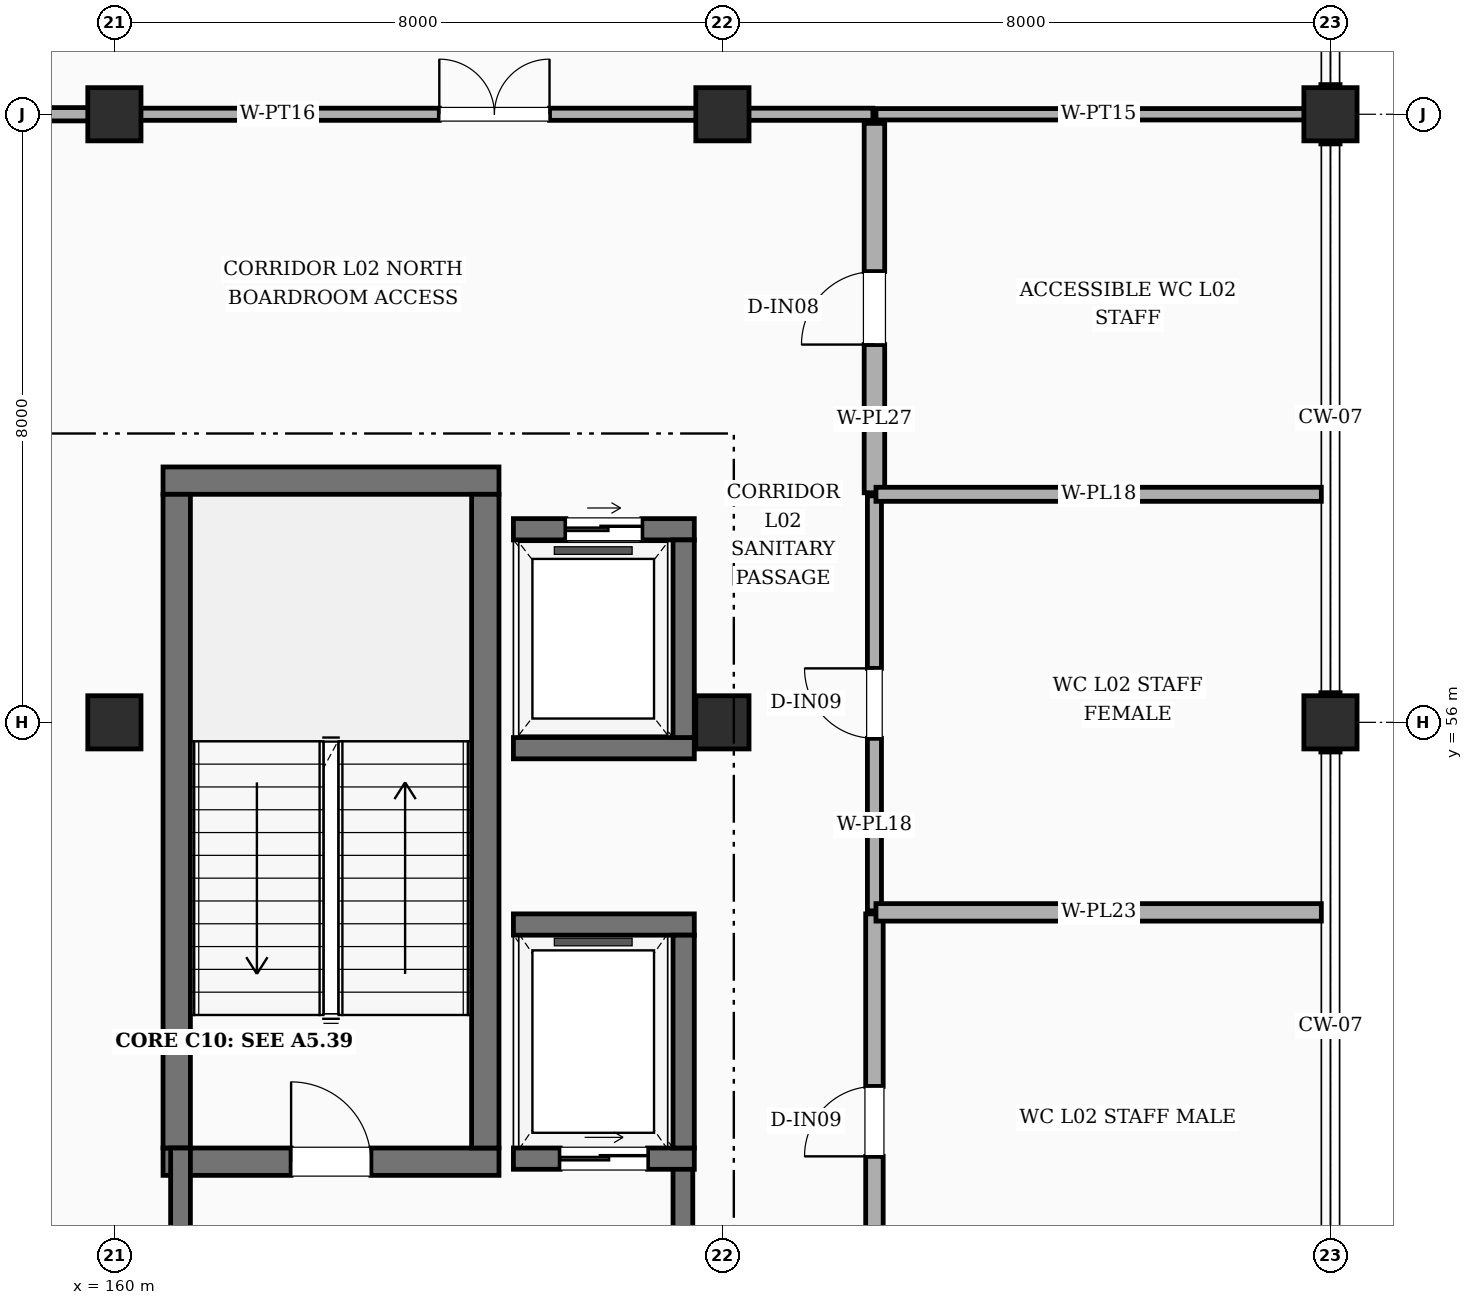
"""IFC4 building model, lengths in metres.
Left out: names, types, materials, properties, quantities, classifications, styles, units other than length and angle.
Written with IfcOpenShell. Run it as: python <this file> out.ifc"""

import sys

from ifc_helpers import new_model, si_unit, direction, frame, frame_2d, origin, origin_2d, place, context, subcontext, project, spatial, rectangle, extrude, element, fill, save


model = new_model("IFC4")
c1 = context("Model", 3, precision=1e-05, world=origin(), true_north=direction((0.0, 1.0)))
c2 = subcontext(c1, "Body", "Model", "MODEL_VIEW")
j1 = project(units=[si_unit("LENGTHUNIT", "METRE"), si_unit("PLANEANGLEUNIT", "RADIAN")], contexts=[c1])
p1 = place(None, origin())
s1 = spatial("IfcSite", under=j1, at=p1, CompositionType="ELEMENT")
p2 = place(p1, origin())
s2 = spatial("IfcBuilding", under=s1, at=p2, CompositionType="ELEMENT")
p3 = place(p2, frame((0.0, 0.0, 10.8)))
s3 = spatial("IfcBuildingStorey", under=s2, at=p3, CompositionType="ELEMENT", Elevation=10.8)
for number, where, z_axis, x_axis in (
    (1, (160.0, 56.0, 0.0), (0.0, 0.0, 1.0), (1.0, 0.0, 0.0)),
    (2, (160.0, 64.0, 0.0), (0.0, 0.0, 1.0), (1.0, 0.0, 0.0)),
    (3, (168.0, 56.0, 0.0), (0.0, 0.0, 1.0), (1.0, 0.0, 0.0)),
    (4, (168.0, 64.0, 0.0), (0.0, 0.0, 1.0), (1.0, 0.0, 0.0)),
    (5, (176.0, 56.0, 0.0), (0.0, 0.0, 1.0), (1.0, 0.0, 0.0)),
    (6, (176.0, 64.0, 0.0), (0.0, 0.0, 1.0), (1.0, 0.0, 0.0)),
):
    element("IfcColumn", number, at=place(p3, frame(where, z_axis=z_axis, x_axis=x_axis)), inside=s3, PredefinedType="COLUMN", context=c2, shape_type="SweptSolid", body=[
        extrude(rectangle(XDim=0.7, YDim=0.7, at=origin_2d()), origin(), (0.0, 0.0, 1.0), 4.2),
    ])
p4 = place(p3, frame((160.64, 50.22, 0.0), z_axis=(0.0, 0.0, 1.0), x_axis=(1.0, 0.0, 0.0)))
e7 = element("IfcWall", 7, at=p4, inside=s3, PredefinedType="SHEAR", context=c2, shape_type="SweptSolid", body=[
    extrude(rectangle(XDim=4.42, YDim=0.36, at=frame_2d((2.21, 0.0))), origin(), (0.0, 0.0, 1.0), 4.2),
])
p5 = place(p4, frame((1.685, 0.0, 0.0)))
e8 = element("IfcOpeningElement", 8, at=p5, cuts=e7, PredefinedType="OPENING", context=c2, shape_type="SweptSolid", body=[
    extrude(rectangle(XDim=1.05, YDim=2.15, at=frame_2d((0.525, 1.075))), frame((0.0, 0.19, 0.0), z_axis=(0.0, -1.0, 0.0), x_axis=(1.0, 0.0, 0.0)), (0.0, 0.0, 1.0), 0.38),
])
p6 = place(p3, frame((160.64, 59.18, 0.0), z_axis=(0.0, 0.0, 1.0), x_axis=(1.0, 0.0, 0.0)))
e9 = element("IfcWall", 9, at=p6, inside=s3, PredefinedType="SHEAR", context=c2, shape_type="SweptSolid", body=[
    extrude(rectangle(XDim=4.42, YDim=0.36, at=frame_2d((2.21, 0.0))), origin(), (0.0, 0.0, 1.0), 4.2),
])
for number, where, z_axis, x_axis in (
    (10, (160.82, 50.4, 0.0), (0.0, 0.0, 1.0), (0.0, 1.0, 0.0)),
    (11, (164.88, 50.4, 0.0), (0.0, 0.0, 1.0), (0.0, 1.0, 0.0)),
):
    element("IfcWall", number, at=place(p3, frame(where, z_axis=z_axis, x_axis=x_axis)), inside=s3, PredefinedType="SHEAR", context=c2, shape_type="SweptSolid", body=[
        extrude(rectangle(XDim=8.6, YDim=0.36, at=frame_2d((4.3, 0.0))), origin(), (0.0, 0.0, 1.0), 4.2),
    ])
for number, where, z_axis, x_axis in (
    (12, (160.87, 46.54, 0.0), (0.0, 0.0, 1.0), (0.0, 1.0, 0.0)),
    (13, (167.48, 46.54, 0.0), (0.0, 0.0, 1.0), (0.0, 1.0, 0.0)),
):
    element("IfcWall", number, at=place(p3, frame(where, z_axis=z_axis, x_axis=x_axis)), inside=s3, PredefinedType="SHEAR", context=c2, shape_type="SweptSolid", body=[
        extrude(rectangle(XDim=3.86, YDim=0.26, at=frame_2d((1.93, 0.0))), origin(), (0.0, 0.0, 1.0), 4.2),
    ])
p7 = place(p3, frame((165.25, 50.26, 0.0), z_axis=(0.0, 0.0, 1.0), x_axis=(1.0, 0.0, 0.0)))
e14 = element("IfcWall", 14, at=p7, inside=s3, PredefinedType="SHEAR", context=c2, shape_type="SweptSolid", body=[
    extrude(rectangle(XDim=2.38, YDim=0.28, at=frame_2d((1.19, 0.0))), origin(), (0.0, 0.0, 1.0), 4.2),
])
p8 = place(p7, frame((0.615, 0.0, 0.0)))
e15 = element("IfcOpeningElement", 15, at=p8, cuts=e14, PredefinedType="OPENING", context=c2, shape_type="SweptSolid", body=[
    extrude(rectangle(XDim=1.15, YDim=2.2, at=frame_2d((0.575, 1.1))), frame((0.0, 0.15, 0.0), z_axis=(0.0, -1.0, 0.0), x_axis=(1.0, 0.0, 0.0)), (0.0, 0.0, 1.0), 0.3),
])
p9 = place(p3, frame((165.25, 53.34, 0.0), z_axis=(0.0, 0.0, 1.0), x_axis=(1.0, 0.0, 0.0)))
e16 = element("IfcWall", 16, at=p9, inside=s3, PredefinedType="SHEAR", context=c2, shape_type="SweptSolid", body=[
    extrude(rectangle(XDim=2.38, YDim=0.28, at=frame_2d((1.19, 0.0))), origin(), (0.0, 0.0, 1.0), 4.2),
])
p10 = place(p3, frame((167.49, 50.4, 0.0), z_axis=(0.0, 0.0, 1.0), x_axis=(0.0, 1.0, 0.0)))
e17 = element("IfcWall", 17, at=p10, inside=s3, PredefinedType="SHEAR", context=c2, shape_type="SweptSolid", body=[
    extrude(rectangle(XDim=2.8, YDim=0.28, at=frame_2d((1.4, 0.0))), origin(), (0.0, 0.0, 1.0), 4.2),
])
p11 = place(p3, frame((165.25, 55.66, 0.0), z_axis=(0.0, 0.0, 1.0), x_axis=(1.0, 0.0, 0.0)))
e18 = element("IfcWall", 18, at=p11, inside=s3, PredefinedType="SHEAR", context=c2, shape_type="SweptSolid", body=[
    extrude(rectangle(XDim=2.38, YDim=0.28, at=frame_2d((1.19, 0.0))), origin(), (0.0, 0.0, 1.0), 4.2),
])
p12 = place(p3, frame((165.25, 58.54, 0.0), z_axis=(0.0, 0.0, 1.0), x_axis=(1.0, 0.0, 0.0)))
e19 = element("IfcWall", 19, at=p12, inside=s3, PredefinedType="SHEAR", context=c2, shape_type="SweptSolid", body=[
    extrude(rectangle(XDim=2.38, YDim=0.28, at=frame_2d((1.19, 0.0))), origin(), (0.0, 0.0, 1.0), 4.2),
])
p13 = place(p12, frame((0.69, 0.0, 0.0)))
e20 = element("IfcOpeningElement", 20, at=p13, cuts=e19, PredefinedType="OPENING", context=c2, shape_type="SweptSolid", body=[
    extrude(rectangle(XDim=1.0, YDim=2.15, at=frame_2d((0.5, 1.075))), frame((0.0, 0.15, 0.0), z_axis=(0.0, -1.0, 0.0), x_axis=(1.0, 0.0, 0.0)), (0.0, 0.0, 1.0), 0.3),
])
p14 = place(p3, frame((167.49, 55.8, 0.0), z_axis=(0.0, 0.0, 1.0), x_axis=(0.0, 1.0, 0.0)))
e21 = element("IfcWall", 21, at=p14, inside=s3, PredefinedType="SHEAR", context=c2, shape_type="SweptSolid", body=[
    extrude(rectangle(XDim=2.6, YDim=0.28, at=frame_2d((1.3, 0.0))), origin(), (0.0, 0.0, 1.0), 4.2),
])
p15 = place(p3, frame((170.0, 48.02, 0.0), z_axis=(0.0, 0.0, 1.0), x_axis=(0.0, 1.0, 0.0)))
e22 = element("IfcWall", 22, at=p15, inside=s3, PredefinedType="PLUMBINGWALL", context=c2, shape_type="SweptSolid", body=[
    extrude(rectangle(XDim=5.46, YDim=0.23, at=frame_2d((2.73, 0.0))), origin(), (0.0, 0.0, 1.0), 3.25),
])
p16 = place(p15, frame((2.27, 0.0, 0.0)))
e23 = element("IfcOpeningElement", 23, at=p16, cuts=e22, PredefinedType="OPENING", context=c2, shape_type="SweptSolid", body=[
    extrude(rectangle(XDim=0.92, YDim=2.1, at=frame_2d((0.46, 1.05))), frame((0.0, 0.125, 0.0), z_axis=(0.0, -1.0, 0.0), x_axis=(1.0, 0.0, 0.0)), (0.0, 0.0, 1.0), 0.25),
])
p17 = place(p3, frame((170.0, 53.52, 0.0), z_axis=(0.0, 0.0, 1.0), x_axis=(0.0, 1.0, 0.0)))
e24 = element("IfcWall", 24, at=p17, inside=s3, PredefinedType="PLUMBINGWALL", context=c2, shape_type="SweptSolid", body=[
    extrude(rectangle(XDim=5.46, YDim=0.185, at=frame_2d((2.73, 0.0))), origin(), (0.0, 0.0, 1.0), 3.25),
])
p18 = place(p17, frame((2.27, 0.0, 0.0)))
e25 = element("IfcOpeningElement", 25, at=p18, cuts=e24, PredefinedType="OPENING", context=c2, shape_type="SweptSolid", body=[
    extrude(rectangle(XDim=0.92, YDim=2.1, at=frame_2d((0.46, 1.05))), frame((0.0, 0.103, 0.0), z_axis=(0.0, -1.0, 0.0), x_axis=(1.0, 0.0, 0.0)), (0.0, 0.0, 1.0), 0.205),
])
p19 = place(p3, frame((170.0, 59.02, 0.0), z_axis=(0.0, 0.0, 1.0), x_axis=(0.0, 1.0, 0.0)))
e26 = element("IfcWall", 26, at=p19, inside=s3, PredefinedType="PLUMBINGWALL", context=c2, shape_type="SweptSolid", body=[
    extrude(rectangle(XDim=4.86, YDim=0.27, at=frame_2d((2.43, 0.0))), origin(), (0.0, 0.0, 1.0), 3.25),
])
p20 = place(p19, frame((1.95, 0.0, 0.0)))
e27 = element("IfcOpeningElement", 27, at=p20, cuts=e26, PredefinedType="OPENING", context=c2, shape_type="SweptSolid", body=[
    extrude(rectangle(XDim=0.96, YDim=2.1, at=frame_2d((0.48, 1.05))), frame((0.0, 0.145, 0.0), z_axis=(0.0, -1.0, 0.0), x_axis=(1.0, 0.0, 0.0)), (0.0, 0.0, 1.0), 0.29),
])
p21 = place(p3, frame((170.02, 53.5, 0.0), z_axis=(0.0, 0.0, 1.0), x_axis=(1.0, 0.0, 0.0)))
e28 = element("IfcWall", 28, at=p21, inside=s3, PredefinedType="PLUMBINGWALL", context=c2, shape_type="SweptSolid", body=[
    extrude(rectangle(XDim=5.86, YDim=0.23, at=frame_2d((2.93, 0.0))), origin(), (0.0, 0.0, 1.0), 3.33),
])
p22 = place(p3, frame((170.02, 59.0, 0.0), z_axis=(0.0, 0.0, 1.0), x_axis=(1.0, 0.0, 0.0)))
e29 = element("IfcWall", 29, at=p22, inside=s3, PredefinedType="PLUMBINGWALL", context=c2, shape_type="SweptSolid", body=[
    extrude(rectangle(XDim=5.86, YDim=0.185, at=frame_2d((2.93, 0.0))), origin(), (0.0, 0.0, 1.0), 3.33),
])
p23 = place(p3, frame((152.12, 64.0, 0.0), z_axis=(0.0, 0.0, 1.0), x_axis=(1.0, 0.0, 0.0)))
e30 = element("IfcWall", 30, at=p23, inside=s3, PredefinedType="PARTITIONING", context=c2, shape_type="SweptSolid", body=[
    extrude(rectangle(XDim=7.86, YDim=0.175, at=frame_2d((3.93, 0.0))), origin(), (0.0, 0.0, 1.0), 3.25),
])
p24 = place(p3, frame((160.02, 64.0, 0.0), z_axis=(0.0, 0.0, 1.0), x_axis=(1.0, 0.0, 0.0)))
e31 = element("IfcWall", 31, at=p24, inside=s3, PredefinedType="PARTITIONING", context=c2, shape_type="SweptSolid", body=[
    extrude(rectangle(XDim=9.96, YDim=0.16, at=frame_2d((4.98, 0.0))), origin(), (0.0, 0.0, 1.0), 3.25),
])
p25 = place(p24, frame((4.255, 0.0, 0.0)))
e32 = element("IfcOpeningElement", 32, at=p25, cuts=e31, PredefinedType="OPENING", context=c2, shape_type="SweptSolid", body=[
    extrude(rectangle(XDim=1.45, YDim=2.2, at=frame_2d((0.725, 1.1))), frame((0.0, 0.09, 0.0), z_axis=(0.0, -1.0, 0.0), x_axis=(1.0, 0.0, 0.0)), (0.0, 0.0, 1.0), 0.18),
])
p26 = place(p3, frame((170.02, 64.0, 0.0), z_axis=(0.0, 0.0, 1.0), x_axis=(1.0, 0.0, 0.0)))
e33 = element("IfcWall", 33, at=p26, inside=s3, PredefinedType="PARTITIONING", context=c2, shape_type="SweptSolid", body=[
    extrude(rectangle(XDim=5.86, YDim=0.15, at=frame_2d((2.93, 0.0))), origin(), (0.0, 0.0, 1.0), 3.25),
])
p27 = place(p5, origin())
e34 = element("IfcDoor", 34, at=p27, inside=s3, OperationType="SINGLE_SWING_LEFT", PredefinedType="DOOR", context=c2, shape_type="SweptSolid", body=[
    extrude(rectangle(XDim=1.05, YDim=2.15, at=frame_2d((0.525, 1.075))), frame((0.0, 0.025, 0.0), z_axis=(0.0, -1.0, 0.0), x_axis=(1.0, 0.0, 0.0)), (0.0, 0.0, 1.0), 0.05),
])
fill(e8, e34)
p28 = place(p8, origin())
e35 = element("IfcDoor", 35, at=p28, inside=s3, OperationType="SLIDING_TO_LEFT", PredefinedType="DOOR", context=c2, shape_type="SweptSolid", body=[
    extrude(rectangle(XDim=1.15, YDim=2.2, at=frame_2d((0.575, 1.1))), frame((0.0, 0.025, 0.0), z_axis=(0.0, -1.0, 0.0), x_axis=(1.0, 0.0, 0.0)), (0.0, 0.0, 1.0), 0.05),
])
fill(e15, e35)
p29 = place(p13, origin())
e36 = element("IfcDoor", 36, at=p29, inside=s3, OperationType="SLIDING_TO_LEFT", PredefinedType="DOOR", context=c2, shape_type="SweptSolid", body=[
    extrude(rectangle(XDim=1.0, YDim=2.15, at=frame_2d((0.5, 1.075))), frame((0.0, 0.025, 0.0), z_axis=(0.0, -1.0, 0.0), x_axis=(1.0, 0.0, 0.0)), (0.0, 0.0, 1.0), 0.05),
])
fill(e20, e36)
p30 = place(p16, origin())
e37 = element("IfcDoor", 37, at=p30, inside=s3, OperationType="SINGLE_SWING_LEFT", PredefinedType="DOOR", context=c2, shape_type="SweptSolid", body=[
    extrude(rectangle(XDim=0.92, YDim=2.1, at=frame_2d((0.46, 1.05))), frame((0.0, 0.025, 0.0), z_axis=(0.0, -1.0, 0.0), x_axis=(1.0, 0.0, 0.0)), (0.0, 0.0, 1.0), 0.05),
])
fill(e23, e37)
p31 = place(p18, origin())
e38 = element("IfcDoor", 38, at=p31, inside=s3, OperationType="SINGLE_SWING_RIGHT", PredefinedType="DOOR", context=c2, shape_type="SweptSolid", body=[
    extrude(rectangle(XDim=0.92, YDim=2.1, at=frame_2d((0.46, 1.05))), frame((0.0, 0.025, 0.0), z_axis=(0.0, -1.0, 0.0), x_axis=(1.0, 0.0, 0.0)), (0.0, 0.0, 1.0), 0.05),
])
fill(e25, e38)
p32 = place(p20, origin())
e39 = element("IfcDoor", 39, at=p32, inside=s3, OperationType="SINGLE_SWING_LEFT", PredefinedType="DOOR", context=c2, shape_type="SweptSolid", body=[
    extrude(rectangle(XDim=0.96, YDim=2.1, at=frame_2d((0.48, 1.05))), frame((0.0, 0.025, 0.0), z_axis=(0.0, -1.0, 0.0), x_axis=(1.0, 0.0, 0.0)), (0.0, 0.0, 1.0), 0.05),
])
fill(e27, e39)
p33 = place(p25, origin())
e40 = element("IfcDoor", 40, at=p33, inside=s3, OperationType="DOUBLE_DOOR_SINGLE_SWING", PredefinedType="DOOR", context=c2, shape_type="SweptSolid", body=[
    extrude(rectangle(XDim=1.45, YDim=2.2, at=frame_2d((0.725, 1.1))), frame((0.0, 0.025, 0.0), z_axis=(0.0, -1.0, 0.0), x_axis=(1.0, 0.0, 0.0)), (0.0, 0.0, 1.0), 0.05),
])
fill(e32, e40)
save(model, sys.argv[1])
